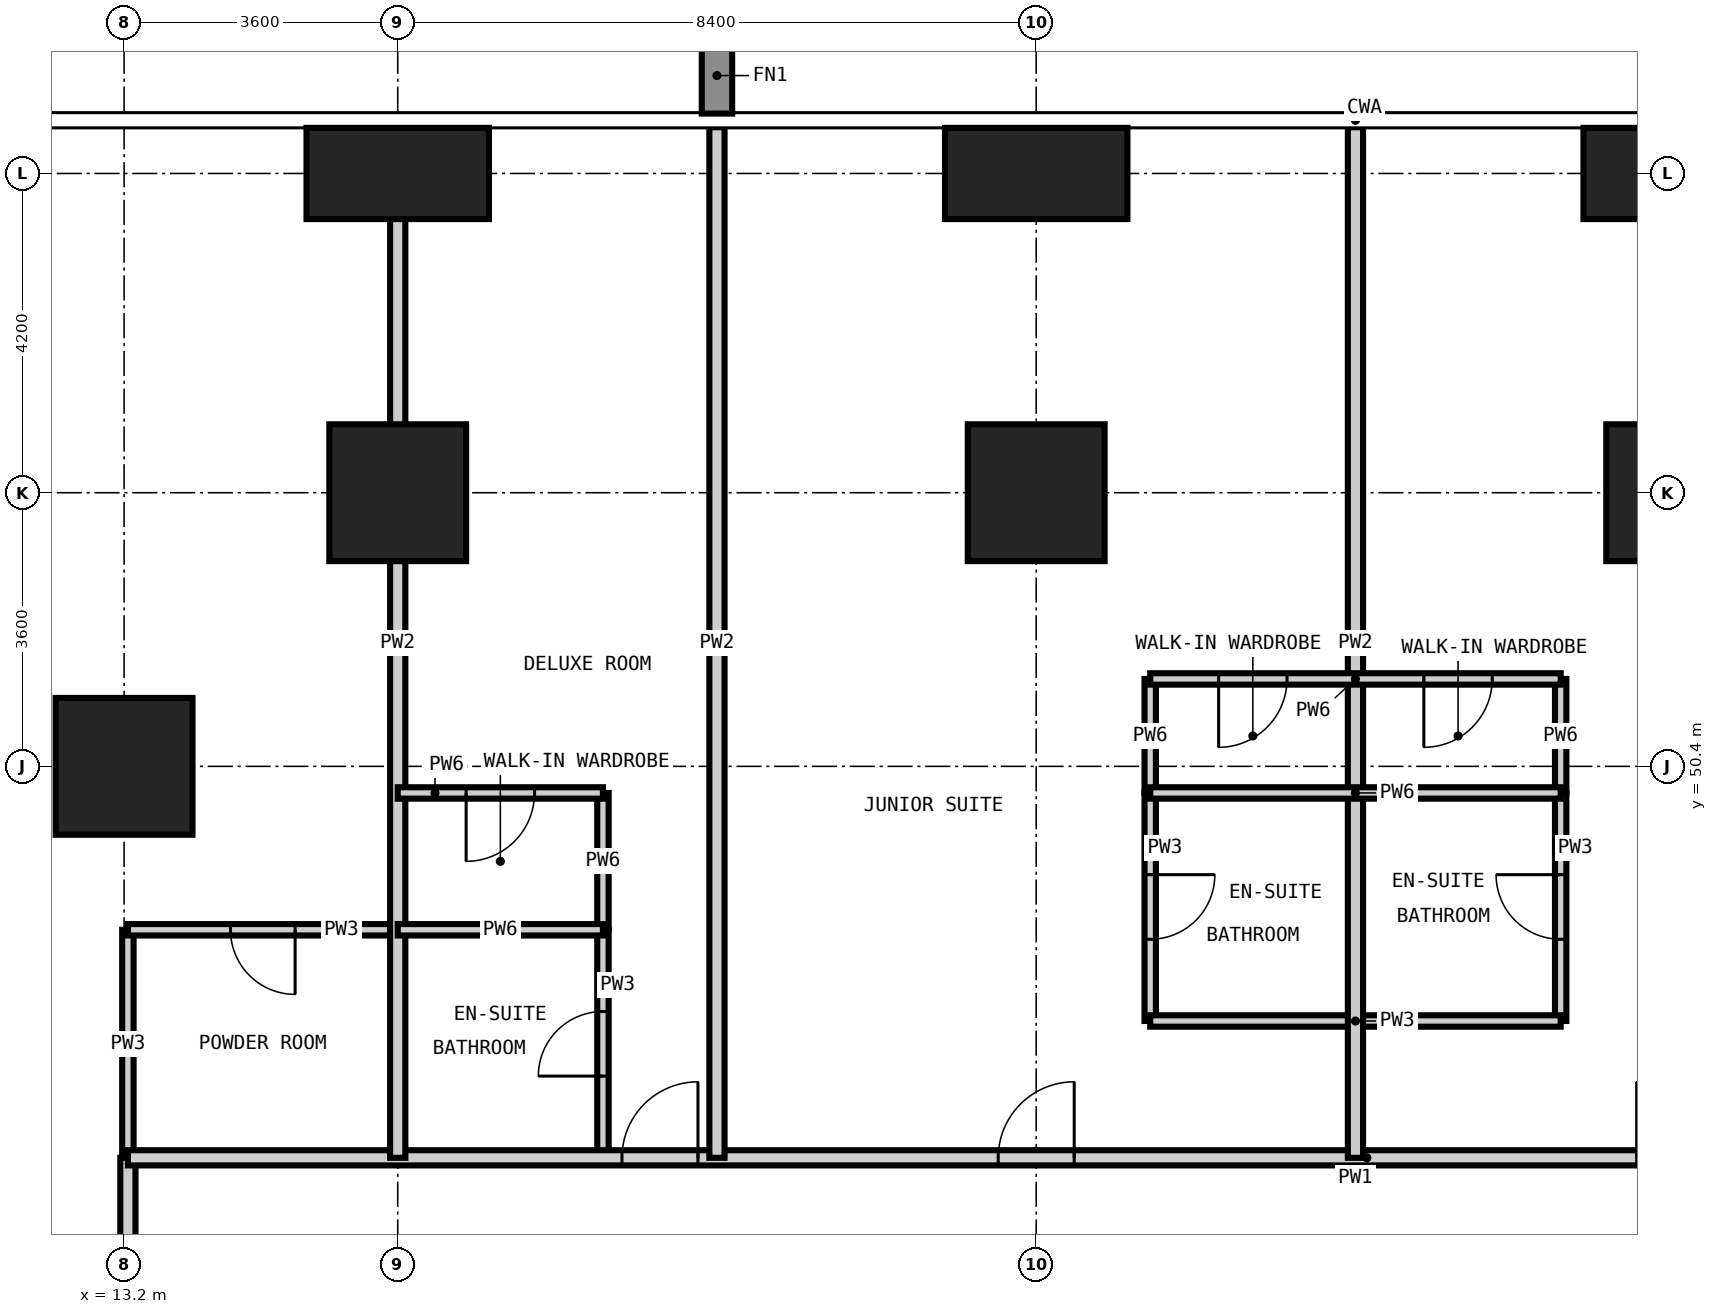
"""IFC4 building model, lengths in metres.
Left out: names, types, materials, properties, quantities, classifications, styles, units other than length and angle.
Written with IfcOpenShell. Run it as: python <this file> out.ifc"""

import sys

from ifc_helpers import new_model, si_unit, direction, frame, frame_2d, origin, origin_2d, place, context, subcontext, project, spatial, rectangle, extrude, element, fill, save


model = new_model("IFC4")
c1 = context("Model", 3, precision=1e-05, world=origin(), true_north=direction((0.0, 1.0)))
c2 = subcontext(c1, "Body", "Model", "MODEL_VIEW")
j1 = project(units=[si_unit("LENGTHUNIT", "METRE"), si_unit("PLANEANGLEUNIT", "RADIAN")], contexts=[c1])
p1 = place(None, origin())
s1 = spatial("IfcSite", under=j1, at=p1, CompositionType="ELEMENT")
p2 = place(p1, origin())
s2 = spatial("IfcBuilding", under=s1, at=p2, CompositionType="ELEMENT")
p3 = place(p2, frame((0.0, 0.0, 34.2)))
s3 = spatial("IfcBuildingStorey", under=s2, at=p3, CompositionType="ELEMENT", Elevation=34.2)
for number, where, z_axis, x_axis in (
    (1, (13.2, 50.4, -0.35), (0.0, 0.0, 1.0), (1.0, 0.0, 0.0)),
    (2, (16.8, 54.0, -0.35), (0.0, 0.0, 1.0), (1.0, 0.0, 0.0)),
):
    element("IfcColumn", number, at=place(p3, frame(where, z_axis=z_axis, x_axis=x_axis)), inside=s3, PredefinedType="COLUMN", context=c2, shape_type="SweptSolid", body=[
        extrude(rectangle(XDim=1.8, YDim=1.8, at=origin_2d()), origin(), (0.0, 0.0, 1.0), 3.6),
    ])
p4 = place(p3, frame((16.8, 58.2, -0.35), z_axis=(0.0, 0.0, 1.0), x_axis=(1.0, 0.0, 0.0)))
e3 = element("IfcColumn", 3, at=p4, inside=s3, PredefinedType="COLUMN", context=c2, shape_type="SweptSolid", body=[
    extrude(rectangle(XDim=2.4, YDim=1.2, at=origin_2d()), origin(), (0.0, 0.0, 1.0), 3.6),
])
p5 = place(p3, frame((25.2, 54.0, -0.35), z_axis=(0.0, 0.0, 1.0), x_axis=(1.0, 0.0, 0.0)))
e4 = element("IfcColumn", 4, at=p5, inside=s3, PredefinedType="COLUMN", context=c2, shape_type="SweptSolid", body=[
    extrude(rectangle(XDim=1.8, YDim=1.8, at=origin_2d()), origin(), (0.0, 0.0, 1.0), 3.6),
])
p6 = place(p3, frame((25.2, 58.2, -0.35), z_axis=(0.0, 0.0, 1.0), x_axis=(1.0, 0.0, 0.0)))
e5 = element("IfcColumn", 5, at=p6, inside=s3, PredefinedType="COLUMN", context=c2, shape_type="SweptSolid", body=[
    extrude(rectangle(XDim=2.4, YDim=1.2, at=origin_2d()), origin(), (0.0, 0.0, 1.0), 3.6),
])
p7 = place(p3, frame((33.6, 54.0, -0.35), z_axis=(0.0, 0.0, 1.0), x_axis=(1.0, 0.0, 0.0)))
e6 = element("IfcColumn", 6, at=p7, inside=s3, PredefinedType="COLUMN", context=c2, shape_type="SweptSolid", body=[
    extrude(rectangle(XDim=1.8, YDim=1.8, at=origin_2d()), origin(), (0.0, 0.0, 1.0), 3.6),
])
p8 = place(p3, frame((33.6, 58.2, -0.35), z_axis=(0.0, 0.0, 1.0), x_axis=(1.0, 0.0, 0.0)))
e7 = element("IfcColumn", 7, at=p8, inside=s3, PredefinedType="COLUMN", context=c2, shape_type="SweptSolid", body=[
    extrude(rectangle(XDim=2.4, YDim=1.2, at=origin_2d()), origin(), (0.0, 0.0, 1.0), 3.6),
])
p9 = place(p3, frame((13.25, 45.25, 0.0), z_axis=(0.0, 0.0, 1.0), x_axis=(0.0, 1.0, 0.0)))
e8 = element("IfcWall", 8, at=p9, inside=s3, PredefinedType="PARTITIONING", context=c2, shape_type="SweptSolid", body=[
    extrude(rectangle(XDim=3.0, YDim=0.15, at=frame_2d((1.5, 0.0))), origin(), (0.0, 0.0, 1.0), 3.25),
])
p10 = place(p3, frame((19.5, 45.25, 0.0), z_axis=(0.0, 0.0, 1.0), x_axis=(0.0, 1.0, 0.0)))
e9 = element("IfcWall", 9, at=p10, inside=s3, PredefinedType="PARTITIONING", context=c2, shape_type="SweptSolid", body=[
    extrude(rectangle(XDim=3.0, YDim=0.15, at=frame_2d((1.5, 0.0))), origin(), (0.0, 0.0, 1.0), 3.25),
])
p11 = place(p10, frame((1.075, 0.0, 0.0)))
e10 = element("IfcOpeningElement", 10, at=p11, cuts=e9, PredefinedType="OPENING", context=c2, shape_type="SweptSolid", body=[
    extrude(rectangle(XDim=0.85, YDim=2.1, at=frame_2d((0.425, 1.05))), frame((0.0, 0.085, 0.0), z_axis=(0.0, -1.0, 0.0), x_axis=(1.0, 0.0, 0.0)), (0.0, 0.0, 1.0), 0.17),
])
p12 = place(p3, frame((26.7, 47.05, 0.0), z_axis=(0.0, 0.0, 1.0), x_axis=(0.0, 1.0, 0.0)))
e11 = element("IfcWall", 11, at=p12, inside=s3, PredefinedType="PARTITIONING", context=c2, shape_type="SweptSolid", body=[
    extrude(rectangle(XDim=3.0, YDim=0.15, at=frame_2d((1.5, 0.0))), origin(), (0.0, 0.0, 1.0), 3.25),
])
p13 = place(p12, frame((1.075, 0.0, 0.0)))
e12 = element("IfcOpeningElement", 12, at=p13, cuts=e11, PredefinedType="OPENING", context=c2, shape_type="SweptSolid", body=[
    extrude(rectangle(XDim=0.85, YDim=2.1, at=frame_2d((0.425, 1.05))), frame((0.0, 0.085, 0.0), z_axis=(0.0, -1.0, 0.0), x_axis=(1.0, 0.0, 0.0)), (0.0, 0.0, 1.0), 0.17),
])
p14 = place(p3, frame((32.1, 47.05, 0.0), z_axis=(0.0, 0.0, 1.0), x_axis=(0.0, 1.0, 0.0)))
e13 = element("IfcWall", 13, at=p14, inside=s3, PredefinedType="PARTITIONING", context=c2, shape_type="SweptSolid", body=[
    extrude(rectangle(XDim=3.0, YDim=0.15, at=frame_2d((1.5, 0.0))), origin(), (0.0, 0.0, 1.0), 3.25),
])
p15 = place(p14, frame((1.075, 0.0, 0.0)))
e14 = element("IfcOpeningElement", 14, at=p15, cuts=e13, PredefinedType="OPENING", context=c2, shape_type="SweptSolid", body=[
    extrude(rectangle(XDim=0.85, YDim=2.1, at=frame_2d((0.425, 1.05))), frame((0.0, 0.085, 0.0), z_axis=(0.0, -1.0, 0.0), x_axis=(1.0, 0.0, 0.0)), (0.0, 0.0, 1.0), 0.17),
])
p16 = place(p3, frame((26.7, 47.05, 0.0), z_axis=(0.0, 0.0, 1.0), x_axis=(1.0, 0.0, 0.0)))
e15 = element("IfcWall", 15, at=p16, inside=s3, PredefinedType="PARTITIONING", context=c2, shape_type="SweptSolid", body=[
    extrude(rectangle(XDim=5.4, YDim=0.15, at=frame_2d((2.7, 0.0))), origin(), (0.0, 0.0, 1.0), 3.25),
])
p17 = place(p3, frame((13.25, 48.25, 0.0), z_axis=(0.0, 0.0, 1.0), x_axis=(1.0, 0.0, 0.0)))
e16 = element("IfcWall", 16, at=p17, inside=s3, PredefinedType="PARTITIONING", context=c2, shape_type="SweptSolid", body=[
    extrude(rectangle(XDim=3.55, YDim=0.15, at=frame_2d((1.775, 0.0))), origin(), (0.0, 0.0, 1.0), 3.25),
])
p18 = place(p17, frame((1.35, 0.0, 0.0)))
e17 = element("IfcOpeningElement", 17, at=p18, cuts=e16, PredefinedType="OPENING", context=c2, shape_type="SweptSolid", body=[
    extrude(rectangle(XDim=0.85, YDim=2.1, at=frame_2d((0.425, 1.05))), frame((0.0, 0.085, 0.0), z_axis=(0.0, -1.0, 0.0), x_axis=(1.0, 0.0, 0.0)), (0.0, 0.0, 1.0), 0.17),
])
p19 = place(p3, frame((13.25, 13.25, 0.0), z_axis=(0.0, 0.0, 1.0), x_axis=(0.0, 1.0, 0.0)))
e18 = element("IfcWall", 18, at=p19, inside=s3, PredefinedType="PARTITIONING", context=c2, shape_type="SweptSolid", body=[
    extrude(rectangle(XDim=32.0, YDim=0.2, at=frame_2d((16.0, 0.0))), origin(), (0.0, 0.0, 1.0), 3.25),
])
p20 = place(p19, frame((9.35, 0.0, 0.0)))
e19 = element("IfcOpeningElement", 19, at=p20, cuts=e18, PredefinedType="OPENING", context=c2, shape_type="SweptSolid", body=[
    extrude(rectangle(XDim=1.0, YDim=2.2, at=frame_2d((0.5, 1.1))), frame((0.0, 0.11, 0.0), z_axis=(0.0, -1.0, 0.0), x_axis=(1.0, 0.0, 0.0)), (0.0, 0.0, 1.0), 0.22),
])
p21 = place(p19, frame((16.4, 0.0, 0.0)))
e20 = element("IfcOpeningElement", 20, at=p21, cuts=e18, PredefinedType="OPENING", context=c2, shape_type="SweptSolid", body=[
    extrude(rectangle(XDim=1.0, YDim=2.2, at=frame_2d((0.5, 1.1))), frame((0.0, 0.11, 0.0), z_axis=(0.0, -1.0, 0.0), x_axis=(1.0, 0.0, 0.0)), (0.0, 0.0, 1.0), 0.22),
])
p22 = place(p19, frame((23.3, 0.0, 0.0)))
e21 = element("IfcOpeningElement", 21, at=p22, cuts=e18, PredefinedType="OPENING", context=c2, shape_type="SweptSolid", body=[
    extrude(rectangle(XDim=1.0, YDim=2.2, at=frame_2d((0.5, 1.1))), frame((0.0, 0.11, 0.0), z_axis=(0.0, -1.0, 0.0), x_axis=(1.0, 0.0, 0.0)), (0.0, 0.0, 1.0), 0.22),
])
p23 = place(p19, frame((24.8, 0.0, 0.0)))
e22 = element("IfcOpeningElement", 22, at=p23, cuts=e18, PredefinedType="OPENING", context=c2, shape_type="SweptSolid", body=[
    extrude(rectangle(XDim=1.0, YDim=2.2, at=frame_2d((0.5, 1.1))), frame((0.0, 0.11, 0.0), z_axis=(0.0, -1.0, 0.0), x_axis=(1.0, 0.0, 0.0)), (0.0, 0.0, 1.0), 0.22),
])
p24 = place(p19, frame((1.275, 0.0, 0.0)))
e23 = element("IfcOpeningElement", 23, at=p24, cuts=e18, PredefinedType="OPENING", context=c2, shape_type="SweptSolid", body=[
    extrude(rectangle(XDim=1.0, YDim=2.2, at=frame_2d((0.5, 1.1))), frame((0.0, 0.11, 0.0), z_axis=(0.0, -1.0, 0.0), x_axis=(1.0, 0.0, 0.0)), (0.0, 0.0, 1.0), 0.22),
])
p25 = place(p19, frame((29.875, 0.0, 0.0)))
e24 = element("IfcOpeningElement", 24, at=p25, cuts=e18, PredefinedType="OPENING", context=c2, shape_type="SweptSolid", body=[
    extrude(rectangle(XDim=1.0, YDim=2.2, at=frame_2d((0.5, 1.1))), frame((0.0, 0.11, 0.0), z_axis=(0.0, -1.0, 0.0), x_axis=(1.0, 0.0, 0.0)), (0.0, 0.0, 1.0), 0.22),
])
p26 = place(p3, frame((13.25, 45.25, 0.0), z_axis=(0.0, 0.0, 1.0), x_axis=(1.0, 0.0, 0.0)))
e25 = element("IfcWall", 25, at=p26, inside=s3, PredefinedType="PARTITIONING", context=c2, shape_type="SweptSolid", body=[
    extrude(rectangle(XDim=32.6, YDim=0.2, at=frame_2d((16.3, 0.0))), origin(), (0.0, 0.0, 1.0), 3.25),
])
p27 = place(p26, frame((6.5, 0.0, 0.0)))
e26 = element("IfcOpeningElement", 26, at=p27, cuts=e25, PredefinedType="OPENING", context=c2, shape_type="SweptSolid", body=[
    extrude(rectangle(XDim=1.0, YDim=2.2, at=frame_2d((0.5, 1.1))), frame((0.0, 0.11, 0.0), z_axis=(0.0, -1.0, 0.0), x_axis=(1.0, 0.0, 0.0)), (0.0, 0.0, 1.0), 0.22),
])
p28 = place(p26, frame((11.45, 0.0, 0.0)))
e27 = element("IfcOpeningElement", 27, at=p28, cuts=e25, PredefinedType="OPENING", context=c2, shape_type="SweptSolid", body=[
    extrude(rectangle(XDim=1.0, YDim=2.2, at=frame_2d((0.5, 1.1))), frame((0.0, 0.11, 0.0), z_axis=(0.0, -1.0, 0.0), x_axis=(1.0, 0.0, 0.0)), (0.0, 0.0, 1.0), 0.22),
])
p29 = place(p26, frame((19.85, 0.0, 0.0)))
e28 = element("IfcOpeningElement", 28, at=p29, cuts=e25, PredefinedType="OPENING", context=c2, shape_type="SweptSolid", body=[
    extrude(rectangle(XDim=1.0, YDim=2.2, at=frame_2d((0.5, 1.1))), frame((0.0, 0.11, 0.0), z_axis=(0.0, -1.0, 0.0), x_axis=(1.0, 0.0, 0.0)), (0.0, 0.0, 1.0), 0.22),
])
p30 = place(p26, frame((24.8, 0.0, 0.0)))
e29 = element("IfcOpeningElement", 29, at=p30, cuts=e25, PredefinedType="OPENING", context=c2, shape_type="SweptSolid", body=[
    extrude(rectangle(XDim=1.0, YDim=2.2, at=frame_2d((0.5, 1.1))), frame((0.0, 0.11, 0.0), z_axis=(0.0, -1.0, 0.0), x_axis=(1.0, 0.0, 0.0)), (0.0, 0.0, 1.0), 0.22),
])
for number, where, z_axis, x_axis in (
    (30, (16.8, 45.25, 0.0), (0.0, 0.0, 1.0), (0.0, 1.0, 0.0)),
    (31, (21.0, 45.25, 0.0), (0.0, 0.0, 1.0), (0.0, 1.0, 0.0)),
    (32, (29.4, 45.25, 0.0), (0.0, 0.0, 1.0), (0.0, 1.0, 0.0)),
):
    element("IfcWall", number, at=place(p3, frame(where, z_axis=z_axis, x_axis=x_axis)), inside=s3, PredefinedType="PARTITIONING", context=c2, shape_type="SweptSolid", body=[
        extrude(rectangle(XDim=13.558, YDim=0.2, at=frame_2d((6.779, 0.0))), origin(), (0.0, 0.0, 1.0), 3.25),
    ])
p31 = place(p3, frame((19.5, 48.25, 0.0), z_axis=(0.0, 0.0, 1.0), x_axis=(0.0, 1.0, 0.0)))
e33 = element("IfcWall", 33, at=p31, inside=s3, PredefinedType="PARTITIONING", context=c2, shape_type="SweptSolid", body=[
    extrude(rectangle(XDim=1.8, YDim=0.15, at=frame_2d((0.9, 0.0))), origin(), (0.0, 0.0, 1.0), 3.25),
])
for number, where, z_axis, x_axis in (
    (34, (26.7, 50.05, 0.0), (0.0, 0.0, 1.0), (0.0, 1.0, 0.0)),
    (35, (32.1, 50.05, 0.0), (0.0, 0.0, 1.0), (0.0, 1.0, 0.0)),
):
    element("IfcWall", number, at=place(p3, frame(where, z_axis=z_axis, x_axis=x_axis)), inside=s3, PredefinedType="PARTITIONING", context=c2, shape_type="SweptSolid", body=[
        extrude(rectangle(XDim=1.5, YDim=0.15, at=frame_2d((0.75, 0.0))), origin(), (0.0, 0.0, 1.0), 3.25),
    ])
p32 = place(p3, frame((16.8, 48.25, 0.0), z_axis=(0.0, 0.0, 1.0), x_axis=(1.0, 0.0, 0.0)))
e36 = element("IfcWall", 36, at=p32, inside=s3, PredefinedType="PARTITIONING", context=c2, shape_type="SweptSolid", body=[
    extrude(rectangle(XDim=2.7, YDim=0.15, at=frame_2d((1.35, 0.0))), origin(), (0.0, 0.0, 1.0), 3.25),
])
p33 = place(p3, frame((16.8, 50.05, 0.0), z_axis=(0.0, 0.0, 1.0), x_axis=(1.0, 0.0, 0.0)))
e37 = element("IfcWall", 37, at=p33, inside=s3, PredefinedType="PARTITIONING", context=c2, shape_type="SweptSolid", body=[
    extrude(rectangle(XDim=2.7, YDim=0.15, at=frame_2d((1.35, 0.0))), origin(), (0.0, 0.0, 1.0), 3.25),
])
p34 = place(p33, frame((0.9, 0.0, 0.0)))
e38 = element("IfcOpeningElement", 38, at=p34, cuts=e37, PredefinedType="OPENING", context=c2, shape_type="SweptSolid", body=[
    extrude(rectangle(XDim=0.9, YDim=2.1, at=frame_2d((0.45, 1.05))), frame((0.0, 0.085, 0.0), z_axis=(0.0, -1.0, 0.0), x_axis=(1.0, 0.0, 0.0)), (0.0, 0.0, 1.0), 0.17),
])
p35 = place(p3, frame((26.7, 50.05, 0.0), z_axis=(0.0, 0.0, 1.0), x_axis=(1.0, 0.0, 0.0)))
e39 = element("IfcWall", 39, at=p35, inside=s3, PredefinedType="PARTITIONING", context=c2, shape_type="SweptSolid", body=[
    extrude(rectangle(XDim=5.4, YDim=0.15, at=frame_2d((2.7, 0.0))), origin(), (0.0, 0.0, 1.0), 3.25),
])
p36 = place(p3, frame((26.7, 51.55, 0.0), z_axis=(0.0, 0.0, 1.0), x_axis=(1.0, 0.0, 0.0)))
e40 = element("IfcWall", 40, at=p36, inside=s3, PredefinedType="PARTITIONING", context=c2, shape_type="SweptSolid", body=[
    extrude(rectangle(XDim=5.4, YDim=0.15, at=frame_2d((2.7, 0.0))), origin(), (0.0, 0.0, 1.0), 3.25),
])
p37 = place(p36, frame((0.9, 0.0, 0.0)))
e41 = element("IfcOpeningElement", 41, at=p37, cuts=e40, PredefinedType="OPENING", context=c2, shape_type="SweptSolid", body=[
    extrude(rectangle(XDim=0.9, YDim=2.1, at=frame_2d((0.45, 1.05))), frame((0.0, 0.085, 0.0), z_axis=(0.0, -1.0, 0.0), x_axis=(1.0, 0.0, 0.0)), (0.0, 0.0, 1.0), 0.17),
])
p38 = place(p36, frame((3.6, 0.0, 0.0)))
e42 = element("IfcOpeningElement", 42, at=p38, cuts=e40, PredefinedType="OPENING", context=c2, shape_type="SweptSolid", body=[
    extrude(rectangle(XDim=0.9, YDim=2.1, at=frame_2d((0.45, 1.05))), frame((0.0, 0.085, 0.0), z_axis=(0.0, -1.0, 0.0), x_axis=(1.0, 0.0, 0.0)), (0.0, 0.0, 1.0), 0.17),
])
p39 = place(p27, origin())
e43 = element("IfcDoor", 43, at=p39, inside=s3, OperationType="SINGLE_SWING_RIGHT", PredefinedType="DOOR", context=c2, shape_type="SweptSolid", body=[
    extrude(rectangle(XDim=1.0, YDim=2.2, at=frame_2d((0.5, 1.1))), frame((0.0, 0.025, 0.0), z_axis=(0.0, -1.0, 0.0), x_axis=(1.0, 0.0, 0.0)), (0.0, 0.0, 1.0), 0.05),
])
fill(e26, e43)
p40 = place(p11, origin())
e44 = element("IfcDoor", 44, at=p40, inside=s3, OperationType="SINGLE_SWING_LEFT", PredefinedType="DOOR", context=c2, shape_type="SweptSolid", body=[
    extrude(rectangle(XDim=0.85, YDim=2.1, at=frame_2d((0.425, 1.05))), frame((0.0, 0.025, 0.0), z_axis=(0.0, -1.0, 0.0), x_axis=(1.0, 0.0, 0.0)), (0.0, 0.0, 1.0), 0.05),
])
fill(e10, e44)
p41 = place(p34, frame((0.9, 0.0, 0.0), z_axis=(0.0, 0.0, 1.0), x_axis=(-1.0, 0.0, 0.0)))
e45 = element("IfcDoor", 45, at=p41, inside=s3, OperationType="SINGLE_SWING_RIGHT", PredefinedType="DOOR", context=c2, shape_type="SweptSolid", body=[
    extrude(rectangle(XDim=0.9, YDim=2.1, at=frame_2d((0.45, 1.05))), frame((0.0, 0.025, 0.0), z_axis=(0.0, -1.0, 0.0), x_axis=(1.0, 0.0, 0.0)), (0.0, 0.0, 1.0), 0.05),
])
fill(e38, e45)
p42 = place(p28, origin())
e46 = element("IfcDoor", 46, at=p42, inside=s3, OperationType="SINGLE_SWING_RIGHT", PredefinedType="DOOR", context=c2, shape_type="SweptSolid", body=[
    extrude(rectangle(XDim=1.0, YDim=2.2, at=frame_2d((0.5, 1.1))), frame((0.0, 0.025, 0.0), z_axis=(0.0, -1.0, 0.0), x_axis=(1.0, 0.0, 0.0)), (0.0, 0.0, 1.0), 0.05),
])
fill(e27, e46)
p43 = place(p13, frame((0.85, 0.0, 0.0), z_axis=(0.0, 0.0, 1.0), x_axis=(-1.0, 0.0, 0.0)))
e47 = element("IfcDoor", 47, at=p43, inside=s3, OperationType="SINGLE_SWING_LEFT", PredefinedType="DOOR", context=c2, shape_type="SweptSolid", body=[
    extrude(rectangle(XDim=0.85, YDim=2.1, at=frame_2d((0.425, 1.05))), frame((0.0, 0.025, 0.0), z_axis=(0.0, -1.0, 0.0), x_axis=(1.0, 0.0, 0.0)), (0.0, 0.0, 1.0), 0.05),
])
fill(e12, e47)
p44 = place(p37, frame((0.9, 0.0, 0.0), z_axis=(0.0, 0.0, 1.0), x_axis=(-1.0, 0.0, 0.0)))
e48 = element("IfcDoor", 48, at=p44, inside=s3, OperationType="SINGLE_SWING_RIGHT", PredefinedType="DOOR", context=c2, shape_type="SweptSolid", body=[
    extrude(rectangle(XDim=0.9, YDim=2.1, at=frame_2d((0.45, 1.05))), frame((0.0, 0.025, 0.0), z_axis=(0.0, -1.0, 0.0), x_axis=(1.0, 0.0, 0.0)), (0.0, 0.0, 1.0), 0.05),
])
fill(e41, e48)
p45 = place(p15, origin())
e49 = element("IfcDoor", 49, at=p45, inside=s3, OperationType="SINGLE_SWING_RIGHT", PredefinedType="DOOR", context=c2, shape_type="SweptSolid", body=[
    extrude(rectangle(XDim=0.85, YDim=2.1, at=frame_2d((0.425, 1.05))), frame((0.0, 0.025, 0.0), z_axis=(0.0, -1.0, 0.0), x_axis=(1.0, 0.0, 0.0)), (0.0, 0.0, 1.0), 0.05),
])
fill(e14, e49)
p46 = place(p38, frame((0.9, 0.0, 0.0), z_axis=(0.0, 0.0, 1.0), x_axis=(-1.0, 0.0, 0.0)))
e50 = element("IfcDoor", 50, at=p46, inside=s3, OperationType="SINGLE_SWING_RIGHT", PredefinedType="DOOR", context=c2, shape_type="SweptSolid", body=[
    extrude(rectangle(XDim=0.9, YDim=2.1, at=frame_2d((0.45, 1.05))), frame((0.0, 0.025, 0.0), z_axis=(0.0, -1.0, 0.0), x_axis=(1.0, 0.0, 0.0)), (0.0, 0.0, 1.0), 0.05),
])
fill(e42, e50)
p47 = place(p18, frame((0.85, 0.0, 0.0), z_axis=(0.0, 0.0, 1.0), x_axis=(-1.0, 0.0, 0.0)))
e51 = element("IfcDoor", 51, at=p47, inside=s3, OperationType="SINGLE_SWING_LEFT", PredefinedType="DOOR", context=c2, shape_type="SweptSolid", body=[
    extrude(rectangle(XDim=0.85, YDim=2.1, at=frame_2d((0.425, 1.05))), frame((0.0, 0.025, 0.0), z_axis=(0.0, -1.0, 0.0), x_axis=(1.0, 0.0, 0.0)), (0.0, 0.0, 1.0), 0.05),
])
fill(e17, e51)
save(model, sys.argv[1])
